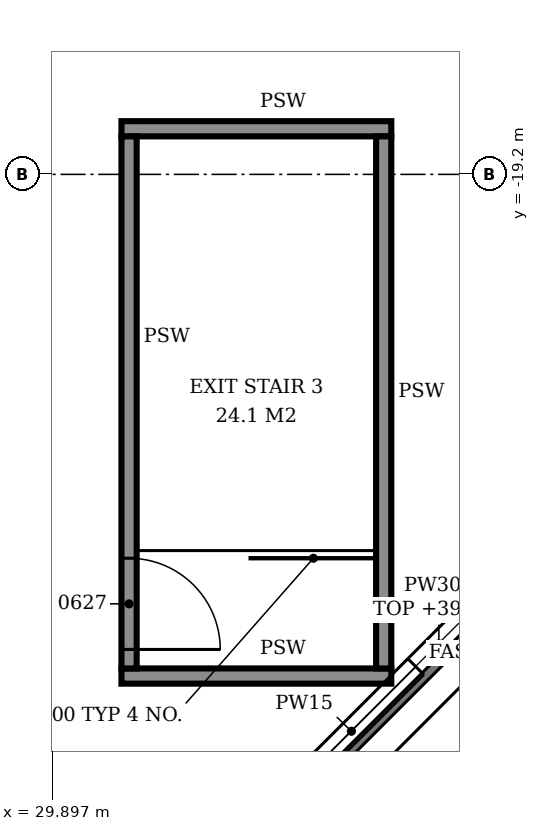
"""IFC4 building model, lengths in metres.
Left out: names, types, materials, properties, quantities, classifications, styles, units other than length and angle.
Written with IfcOpenShell. Run it as: python <this file> out.ifc"""

import sys

from ifc_helpers import new_model, si_unit, direction, frame, frame_2d, origin, place, context, subcontext, project, spatial, rectangle, extrude, element, fill, save


model = new_model("IFC4")
c1 = context("Model", 3, precision=1e-05, world=origin(), true_north=direction((0.0, 1.0)))
c2 = subcontext(c1, "Body", "Model", "MODEL_VIEW")
j1 = project(units=[si_unit("LENGTHUNIT", "METRE"), si_unit("PLANEANGLEUNIT", "RADIAN")], contexts=[c1])
p1 = place(None, origin())
s1 = spatial("IfcSite", under=j1, at=p1, CompositionType="ELEMENT")
p2 = place(p1, origin())
s2 = spatial("IfcBuilding", under=s1, at=p2, CompositionType="ELEMENT")
p3 = place(p2, frame((0.0, 0.0, 35.4)))
s3 = spatial("IfcBuildingStorey", under=s2, at=p3, CompositionType="ELEMENT", Elevation=35.4)
p4 = place(p3, frame((32.675, -27.677, 0.0), z_axis=(0.0, 0.0, 1.0), x_axis=(0.707088024292, 0.707125537583, 0.0)))
e1 = element("IfcWall", 1, at=p4, inside=s3, PredefinedType="SOLIDWALL", context=c2, shape_type="SweptSolid", body=[
    extrude(rectangle(XDim=6.508, YDim=0.3, at=frame_2d((3.254, 0.0))), origin(), (0.0, 0.0, 1.0), 4.05),
])
p5 = place(p4, frame((0.427, 0.0, 0.9)))
e2 = element("IfcOpeningElement", 2, at=p5, cuts=e1, PredefinedType="OPENING", context=c2, shape_type="SweptSolid", body=[
    extrude(rectangle(XDim=2.4, YDim=1.5, at=frame_2d((1.2, 0.75))), frame((0.0, 0.16, 0.0), z_axis=(0.0, -1.0, 0.0), x_axis=(1.0, 0.0, 0.0)), (0.0, 0.0, 1.0), 0.32),
])
p6 = place(p4, frame((3.681, 0.0, 0.9)))
e3 = element("IfcOpeningElement", 3, at=p6, cuts=e1, PredefinedType="OPENING", context=c2, shape_type="SweptSolid", body=[
    extrude(rectangle(XDim=2.4, YDim=1.5, at=frame_2d((1.2, 0.75))), frame((0.0, 0.16, 0.0), z_axis=(0.0, -1.0, 0.0), x_axis=(1.0, 0.0, 0.0)), (0.0, 0.0, 1.0), 0.32),
])
p7 = place(p3, frame((30.8, -25.8, 0.0), z_axis=(0.0, 0.0, 1.0), x_axis=(1.0, 0.0, 0.0)))
e4 = element("IfcWall", 4, at=p7, inside=s3, PredefinedType="SOLIDWALL", context=c2, shape_type="SweptSolid", body=[
    extrude(rectangle(XDim=3.55, YDim=0.2, at=frame_2d((1.775, 0.0))), origin(), (0.0, 0.0, 1.0), 4.65),
])
p8 = place(p3, frame((30.9, -25.7, 0.0), z_axis=(0.0, 0.0, 1.0), x_axis=(0.0, 1.0, 0.0)))
e5 = element("IfcWall", 5, at=p8, inside=s3, PredefinedType="SOLIDWALL", context=c2, shape_type="SweptSolid", body=[
    extrude(rectangle(XDim=7.0, YDim=0.2, at=frame_2d((3.5, 0.0))), origin(), (0.0, 0.0, 1.0), 4.65),
])
p9 = place(p8, frame((0.25, 0.0, 0.0)))
e6 = element("IfcOpeningElement", 6, at=p9, cuts=e5, PredefinedType="OPENING", context=c2, shape_type="SweptSolid", body=[
    extrude(rectangle(XDim=1.2, YDim=2.1, at=frame_2d((0.6, 1.05))), frame((0.0, 0.11, 0.0), z_axis=(0.0, -1.0, 0.0), x_axis=(1.0, 0.0, 0.0)), (0.0, 0.0, 1.0), 0.22),
])
p10 = place(p3, frame((34.25, -25.7, 0.0), z_axis=(0.0, 0.0, 1.0), x_axis=(0.0, 1.0, 0.0)))
e7 = element("IfcWall", 7, at=p10, inside=s3, PredefinedType="SOLIDWALL", context=c2, shape_type="SweptSolid", body=[
    extrude(rectangle(XDim=7.0, YDim=0.2, at=frame_2d((3.5, 0.0))), origin(), (0.0, 0.0, 1.0), 4.65),
])
p11 = place(p3, frame((30.8, -18.6, 0.0), z_axis=(0.0, 0.0, 1.0), x_axis=(1.0, 0.0, 0.0)))
e8 = element("IfcWall", 8, at=p11, inside=s3, PredefinedType="SOLIDWALL", context=c2, shape_type="SweptSolid", body=[
    extrude(rectangle(XDim=3.55, YDim=0.2, at=frame_2d((1.775, 0.0))), origin(), (0.0, 0.0, 1.0), 4.65),
])
p12 = place(p5, origin())
e9 = element("IfcWindow", 9, at=p12, inside=s3, PartitioningType="SINGLE_PANEL", PredefinedType="WINDOW", context=c2, shape_type="SweptSolid", body=[
    extrude(rectangle(XDim=2.4, YDim=1.5, at=frame_2d((1.2, 0.75))), frame((0.0, 0.03, 0.0), z_axis=(0.0, -1.0, 0.0), x_axis=(1.0, 0.0, 0.0)), (0.0, 0.0, 1.0), 0.06),
])
fill(e2, e9)
p13 = place(p9, frame((1.2, 0.0, 0.0), z_axis=(0.0, 0.0, 1.0), x_axis=(-1.0, 0.0, 0.0)))
e10 = element("IfcDoor", 10, at=p13, inside=s3, OperationType="SINGLE_SWING_RIGHT", PredefinedType="DOOR", context=c2, shape_type="SweptSolid", body=[
    extrude(rectangle(XDim=1.2, YDim=2.1, at=frame_2d((0.6, 1.05))), frame((0.0, 0.025, 0.0), z_axis=(0.0, -1.0, 0.0), x_axis=(1.0, 0.0, 0.0)), (0.0, 0.0, 1.0), 0.05),
])
fill(e6, e10)
save(model, sys.argv[1])
